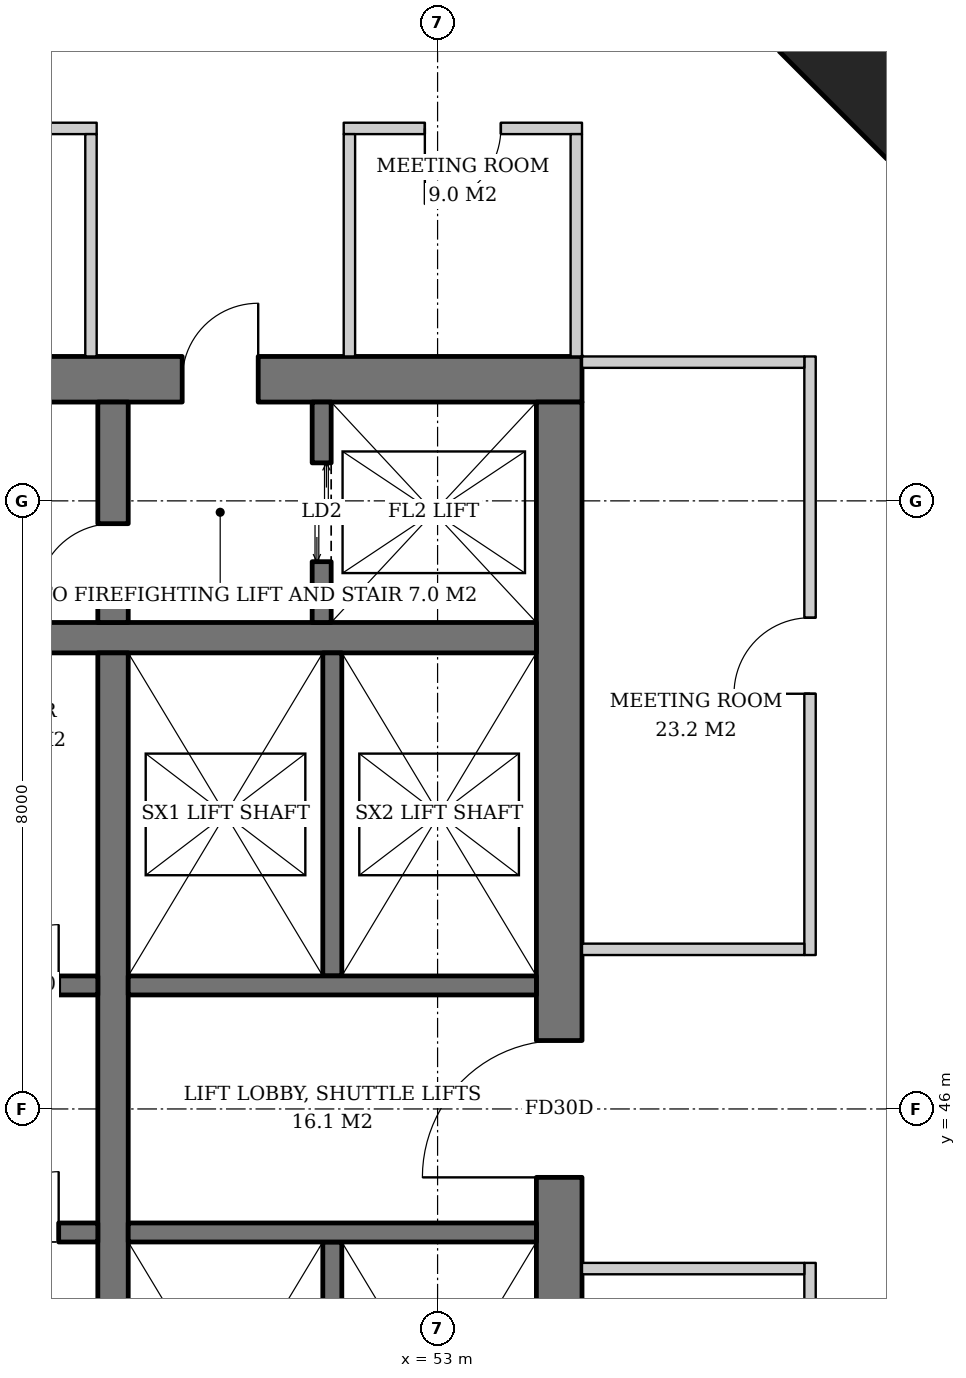
"""IFC4 building model, lengths in metres.
Left out: names, types, materials, properties, quantities, classifications, styles, units other than length and angle.
Written with IfcOpenShell. Run it as: python <this file> out.ifc"""

import sys

from ifc_helpers import new_model, si_unit, direction, frame, frame_2d, origin, origin_2d, place, context, subcontext, project, spatial, rectangle, extrude, element, fill, save


model = new_model("IFC4")
c1 = context("Model", 3, precision=1e-05, world=origin(), true_north=direction((0.0, 1.0)))
c2 = subcontext(c1, "Body", "Model", "MODEL_VIEW")
j1 = project(units=[si_unit("LENGTHUNIT", "METRE"), si_unit("PLANEANGLEUNIT", "RADIAN")], contexts=[c1])
p1 = place(None, origin())
s1 = spatial("IfcSite", under=j1, at=p1, CompositionType="ELEMENT")
p2 = place(p1, origin())
s2 = spatial("IfcBuilding", under=s1, at=p2, CompositionType="ELEMENT")
p3 = place(p2, frame((0.0, 0.0, 207.2)))
s3 = spatial("IfcBuildingStorey", under=s2, at=p3, CompositionType="ELEMENT", Elevation=207.2)
p4 = place(p3, frame((58.95, 59.95, 0.0), z_axis=(-0.031898107953, -0.031898107953, 0.998981992539), x_axis=(0.707106781187, -0.707106781187, 0.0)))
e1 = element("IfcColumn", 1, at=p4, inside=s3, PredefinedType="COLUMN", context=c2, shape_type="SweptSolid", body=[
    extrude(rectangle(XDim=2.0, YDim=2.0, at=origin_2d()), origin(), (0.0, 0.0, 1.0), 3.804),
])
p5 = place(p3, frame((35.1, 55.6, 0.0), z_axis=(0.0, 0.0, 1.0), x_axis=(1.0, 0.0, 0.0)))
e2 = element("IfcWall", 2, at=p5, inside=s3, PredefinedType="SHEAR", context=c2, shape_type="SweptSolid", body=[
    extrude(rectangle(XDim=19.8, YDim=0.6, at=frame_2d((9.9, 0.0))), origin(), (0.0, 0.0, 1.0), 3.8),
])
p6 = place(p5, frame((14.54, 0.0, 0.0)))
e3 = element("IfcOpeningElement", 3, at=p6, cuts=e2, PredefinedType="OPENING", context=c2, shape_type="SweptSolid", body=[
    extrude(rectangle(XDim=1.0, YDim=2.1, at=frame_2d((0.5, 1.05))), frame((0.0, 0.31, 0.0), z_axis=(0.0, -1.0, 0.0), x_axis=(1.0, 0.0, 0.0)), (0.0, 0.0, 1.0), 0.62),
])
p7 = place(p5, frame((1.675, 0.0, 0.0)))
e4 = element("IfcOpeningElement", 4, at=p7, cuts=e2, PredefinedType="OPENING", context=c2, shape_type="SweptSolid", body=[
    extrude(rectangle(XDim=1.0, YDim=2.1, at=frame_2d((0.5, 1.05))), frame((0.0, 0.31, 0.0), z_axis=(0.0, -1.0, 0.0), x_axis=(1.0, 0.0, 0.0)), (0.0, 0.0, 1.0), 0.62),
])
p8 = place(p5, frame((3.587, 0.0, 0.0)))
e5 = element("IfcOpeningElement", 5, at=p8, cuts=e2, PredefinedType="OPENING", context=c2, shape_type="SweptSolid", body=[
    extrude(rectangle(XDim=1.0, YDim=2.1, at=frame_2d((0.5, 1.05))), frame((0.0, 0.31, 0.0), z_axis=(0.0, -1.0, 0.0), x_axis=(1.0, 0.0, 0.0)), (0.0, 0.0, 1.0), 0.62),
])
p9 = place(p3, frame((54.6, 36.7, 0.0), z_axis=(0.0, 0.0, 1.0), x_axis=(0.0, 1.0, 0.0)))
e6 = element("IfcWall", 6, at=p9, inside=s3, PredefinedType="SHEAR", context=c2, shape_type="SweptSolid", body=[
    extrude(rectangle(XDim=18.6, YDim=0.6, at=frame_2d((9.3, 0.0))), origin(), (0.0, 0.0, 1.0), 3.8),
])
p10 = place(p9, frame((8.4, 0.0, 0.0)))
e7 = element("IfcOpeningElement", 7, at=p10, cuts=e6, PredefinedType="OPENING", context=c2, shape_type="SweptSolid", body=[
    extrude(rectangle(XDim=1.8, YDim=2.4, at=frame_2d((0.9, 1.2))), frame((0.0, 0.31, 0.0), z_axis=(0.0, -1.0, 0.0), x_axis=(1.0, 0.0, 0.0)), (0.0, 0.0, 1.0), 0.62),
])
p11 = place(p3, frame((35.7, 52.2, 0.0), z_axis=(0.0, 0.0, 1.0), x_axis=(1.0, 0.0, 0.0)))
e8 = element("IfcWall", 8, at=p11, inside=s3, PredefinedType="SHEAR", context=c2, shape_type="SweptSolid", body=[
    extrude(rectangle(XDim=18.6, YDim=0.4, at=frame_2d((9.3, 0.0))), origin(), (0.0, 0.0, 1.0), 3.8),
])
p12 = place(p3, frame((48.73, 40.0, 0.0), z_axis=(0.0, 0.0, 1.0), x_axis=(0.0, 1.0, 0.0)))
e9 = element("IfcWall", 9, at=p12, inside=s3, PredefinedType="SHEAR", context=c2, shape_type="SweptSolid", body=[
    extrude(rectangle(XDim=12.0, YDim=0.4, at=frame_2d((6.0, 0.0))), origin(), (0.0, 0.0, 1.0), 3.8),
])
p13 = place(p3, frame((48.73, 52.4, 0.0), z_axis=(0.0, 0.0, 1.0), x_axis=(0.0, 1.0, 0.0)))
e10 = element("IfcWall", 10, at=p13, inside=s3, PredefinedType="SHEAR", context=c2, shape_type="SweptSolid", body=[
    extrude(rectangle(XDim=2.9, YDim=0.4, at=frame_2d((1.45, 0.0))), origin(), (0.0, 0.0, 1.0), 3.8),
])
p14 = place(p13, frame((0.3, 0.0, 0.0)))
e11 = element("IfcOpeningElement", 11, at=p14, cuts=e10, PredefinedType="OPENING", context=c2, shape_type="SweptSolid", body=[
    extrude(rectangle(XDim=1.0, YDim=2.1, at=frame_2d((0.5, 1.05))), frame((0.0, 0.21, 0.0), z_axis=(0.0, -1.0, 0.0), x_axis=(1.0, 0.0, 0.0)), (0.0, 0.0, 1.0), 0.42),
])
p15 = place(p3, frame((51.475, 52.4, 0.0), z_axis=(0.0, 0.0, 1.0), x_axis=(0.0, 1.0, 0.0)))
e12 = element("IfcWall", 12, at=p15, inside=s3, PredefinedType="SHEAR", context=c2, shape_type="SweptSolid", body=[
    extrude(rectangle(XDim=2.9, YDim=0.25, at=frame_2d((1.45, 0.0))), origin(), (0.0, 0.0, 1.0), 3.8),
])
p16 = place(p15, frame((0.8, 0.0, 0.0)))
e13 = element("IfcOpeningElement", 13, at=p16, cuts=e12, PredefinedType="OPENING", context=c2, shape_type="SweptSolid", body=[
    extrude(rectangle(XDim=1.3, YDim=2.2, at=frame_2d((0.65, 1.1))), frame((0.0, 0.135, 0.0), z_axis=(0.0, -1.0, 0.0), x_axis=(1.0, 0.0, 0.0)), (0.0, 0.0, 1.0), 0.27),
])
p17 = place(p3, frame((35.7, 47.625, 0.0), z_axis=(0.0, 0.0, 1.0), x_axis=(1.0, 0.0, 0.0)))
e14 = element("IfcWall", 14, at=p17, inside=s3, PredefinedType="SHEAR", context=c2, shape_type="SweptSolid", body=[
    extrude(rectangle(XDim=12.83, YDim=0.25, at=frame_2d((6.415, 0.0))), origin(), (0.0, 0.0, 1.0), 3.8),
])
p18 = place(p17, frame((0.7, 0.0, 0.0)))
e15 = element("IfcOpeningElement", 15, at=p18, cuts=e14, PredefinedType="OPENING", context=c2, shape_type="SweptSolid", body=[
    extrude(rectangle(XDim=1.1, YDim=2.2, at=frame_2d((0.55, 1.1))), frame((0.0, 0.135, 0.0), z_axis=(0.0, -1.0, 0.0), x_axis=(1.0, 0.0, 0.0)), (0.0, 0.0, 1.0), 0.27),
])
p19 = place(p17, frame((3.45, 0.0, 0.0)))
e16 = element("IfcOpeningElement", 16, at=p19, cuts=e14, PredefinedType="OPENING", context=c2, shape_type="SweptSolid", body=[
    extrude(rectangle(XDim=1.1, YDim=2.2, at=frame_2d((0.55, 1.1))), frame((0.0, 0.135, 0.0), z_axis=(0.0, -1.0, 0.0), x_axis=(1.0, 0.0, 0.0)), (0.0, 0.0, 1.0), 0.27),
])
p20 = place(p17, frame((6.2, 0.0, 0.0)))
e17 = element("IfcOpeningElement", 17, at=p20, cuts=e14, PredefinedType="OPENING", context=c2, shape_type="SweptSolid", body=[
    extrude(rectangle(XDim=1.1, YDim=2.2, at=frame_2d((0.55, 1.1))), frame((0.0, 0.135, 0.0), z_axis=(0.0, -1.0, 0.0), x_axis=(1.0, 0.0, 0.0)), (0.0, 0.0, 1.0), 0.27),
])
p21 = place(p17, frame((9.0, 0.0, 0.0)))
e18 = element("IfcOpeningElement", 18, at=p21, cuts=e14, PredefinedType="OPENING", context=c2, shape_type="SweptSolid", body=[
    extrude(rectangle(XDim=1.0, YDim=2.1, at=frame_2d((0.5, 1.05))), frame((0.0, 0.135, 0.0), z_axis=(0.0, -1.0, 0.0), x_axis=(1.0, 0.0, 0.0)), (0.0, 0.0, 1.0), 0.27),
])
p22 = place(p17, frame((11.515, 0.0, 0.0)))
e19 = element("IfcOpeningElement", 19, at=p22, cuts=e14, PredefinedType="OPENING", context=c2, shape_type="SweptSolid", body=[
    extrude(rectangle(XDim=0.8, YDim=2.0, at=frame_2d((0.4, 1.0))), frame((0.0, 0.135, 0.0), z_axis=(0.0, -1.0, 0.0), x_axis=(1.0, 0.0, 0.0)), (0.0, 0.0, 1.0), 0.27),
])
p23 = place(p3, frame((35.7, 44.375, 0.0), z_axis=(0.0, 0.0, 1.0), x_axis=(1.0, 0.0, 0.0)))
e20 = element("IfcWall", 20, at=p23, inside=s3, PredefinedType="SHEAR", context=c2, shape_type="SweptSolid", body=[
    extrude(rectangle(XDim=12.83, YDim=0.25, at=frame_2d((6.415, 0.0))), origin(), (0.0, 0.0, 1.0), 3.8),
])
p24 = place(p23, frame((0.7, 0.0, 0.0)))
e21 = element("IfcOpeningElement", 21, at=p24, cuts=e20, PredefinedType="OPENING", context=c2, shape_type="SweptSolid", body=[
    extrude(rectangle(XDim=1.1, YDim=2.2, at=frame_2d((0.55, 1.1))), frame((0.0, 0.135, 0.0), z_axis=(0.0, -1.0, 0.0), x_axis=(1.0, 0.0, 0.0)), (0.0, 0.0, 1.0), 0.27),
])
p25 = place(p23, frame((3.45, 0.0, 0.0)))
e22 = element("IfcOpeningElement", 22, at=p25, cuts=e20, PredefinedType="OPENING", context=c2, shape_type="SweptSolid", body=[
    extrude(rectangle(XDim=1.1, YDim=2.2, at=frame_2d((0.55, 1.1))), frame((0.0, 0.135, 0.0), z_axis=(0.0, -1.0, 0.0), x_axis=(1.0, 0.0, 0.0)), (0.0, 0.0, 1.0), 0.27),
])
p26 = place(p23, frame((6.2, 0.0, 0.0)))
e23 = element("IfcOpeningElement", 23, at=p26, cuts=e20, PredefinedType="OPENING", context=c2, shape_type="SweptSolid", body=[
    extrude(rectangle(XDim=1.1, YDim=2.2, at=frame_2d((0.55, 1.1))), frame((0.0, 0.135, 0.0), z_axis=(0.0, -1.0, 0.0), x_axis=(1.0, 0.0, 0.0)), (0.0, 0.0, 1.0), 0.27),
])
p27 = place(p23, frame((9.0, 0.0, 0.0)))
e24 = element("IfcOpeningElement", 24, at=p27, cuts=e20, PredefinedType="OPENING", context=c2, shape_type="SweptSolid", body=[
    extrude(rectangle(XDim=1.0, YDim=2.1, at=frame_2d((0.5, 1.05))), frame((0.0, 0.135, 0.0), z_axis=(0.0, -1.0, 0.0), x_axis=(1.0, 0.0, 0.0)), (0.0, 0.0, 1.0), 0.27),
])
p28 = place(p23, frame((11.515, 0.0, 0.0)))
e25 = element("IfcOpeningElement", 25, at=p28, cuts=e20, PredefinedType="OPENING", context=c2, shape_type="SweptSolid", body=[
    extrude(rectangle(XDim=0.8, YDim=2.0, at=frame_2d((0.4, 1.0))), frame((0.0, 0.135, 0.0), z_axis=(0.0, -1.0, 0.0), x_axis=(1.0, 0.0, 0.0)), (0.0, 0.0, 1.0), 0.27),
])
p29 = place(p3, frame((51.615, 47.75, 0.0), z_axis=(0.0, 0.0, 1.0), x_axis=(0.0, 1.0, 0.0)))
e26 = element("IfcWall", 26, at=p29, inside=s3, PredefinedType="SHEAR", context=c2, shape_type="SweptSolid", body=[
    extrude(rectangle(XDim=4.25, YDim=0.25, at=frame_2d((2.125, 0.0))), origin(), (0.0, 0.0, 1.0), 3.8),
])
p30 = place(p3, frame((48.93, 47.625, 0.0), z_axis=(0.0, 0.0, 1.0), x_axis=(1.0, 0.0, 0.0)))
e27 = element("IfcWall", 27, at=p30, inside=s3, PredefinedType="SHEAR", context=c2, shape_type="SweptSolid", body=[
    extrude(rectangle(XDim=5.37, YDim=0.25, at=frame_2d((2.685, 0.0))), origin(), (0.0, 0.0, 1.0), 3.8),
])
p31 = place(p3, frame((51.615, 44.25, 0.0), z_axis=(0.0, 0.0, 1.0), x_axis=(0.0, -1.0, 0.0)))
e28 = element("IfcWall", 28, at=p31, inside=s3, PredefinedType="SHEAR", context=c2, shape_type="SweptSolid", body=[
    extrude(rectangle(XDim=4.25, YDim=0.25, at=frame_2d((2.125, 0.0))), origin(), (0.0, 0.0, 1.0), 3.8),
])
p32 = place(p3, frame((48.93, 44.375, 0.0), z_axis=(0.0, 0.0, 1.0), x_axis=(1.0, 0.0, 0.0)))
e29 = element("IfcWall", 29, at=p32, inside=s3, PredefinedType="SHEAR", context=c2, shape_type="SweptSolid", body=[
    extrude(rectangle(XDim=5.37, YDim=0.25, at=frame_2d((2.685, 0.0))), origin(), (0.0, 0.0, 1.0), 3.8),
])
p33 = place(p3, frame((57.9, 36.1, 0.0), z_axis=(0.0, 0.0, 1.0), x_axis=(0.0, 1.0, 0.0)))
e30 = element("IfcWall", 30, at=p33, inside=s3, PredefinedType="PARTITIONING", context=c2, shape_type="SweptSolid", body=[
    extrude(rectangle(XDim=7.875, YDim=0.15, at=frame_2d((3.938, 0.0))), origin(), (0.0, 0.0, 1.0), 2.867),
])
p34 = place(p33, frame((3.438, 0.0, 0.0)))
e31 = element("IfcOpeningElement", 31, at=p34, cuts=e30, PredefinedType="OPENING", context=c2, shape_type="SweptSolid", body=[
    extrude(rectangle(XDim=1.0, YDim=2.1, at=frame_2d((0.5, 1.05))), frame((0.0, 0.085, 0.0), z_axis=(0.0, -1.0, 0.0), x_axis=(1.0, 0.0, 0.0)), (0.0, 0.0, 1.0), 0.17),
])
p35 = place(p3, frame((54.9, 43.9, 0.0), z_axis=(0.0, 0.0, 1.0), x_axis=(1.0, 0.0, 0.0)))
e32 = element("IfcWall", 32, at=p35, inside=s3, PredefinedType="PARTITIONING", context=c2, shape_type="SweptSolid", body=[
    extrude(rectangle(XDim=2.925, YDim=0.15, at=frame_2d((1.462, 0.0))), origin(), (0.0, 0.0, 1.0), 3.62),
])
p36 = place(p3, frame((57.9, 48.025, 0.0), z_axis=(0.0, 0.0, 1.0), x_axis=(0.0, 1.0, 0.0)))
e33 = element("IfcWall", 33, at=p36, inside=s3, PredefinedType="PARTITIONING", context=c2, shape_type="SweptSolid", body=[
    extrude(rectangle(XDim=7.875, YDim=0.15, at=frame_2d((3.938, 0.0))), origin(), (0.0, 0.0, 1.0), 2.867),
])
p37 = place(p36, frame((3.438, 0.0, 0.0)))
e34 = element("IfcOpeningElement", 34, at=p37, cuts=e33, PredefinedType="OPENING", context=c2, shape_type="SweptSolid", body=[
    extrude(rectangle(XDim=1.0, YDim=2.1, at=frame_2d((0.5, 1.05))), frame((0.0, 0.085, 0.0), z_axis=(0.0, -1.0, 0.0), x_axis=(1.0, 0.0, 0.0)), (0.0, 0.0, 1.0), 0.17),
])
p38 = place(p3, frame((54.9, 48.1, 0.0), z_axis=(0.0, 0.0, 1.0), x_axis=(1.0, 0.0, 0.0)))
e35 = element("IfcWall", 35, at=p38, inside=s3, PredefinedType="PARTITIONING", context=c2, shape_type="SweptSolid", body=[
    extrude(rectangle(XDim=2.925, YDim=0.15, at=frame_2d((1.462, 0.0))), origin(), (0.0, 0.0, 1.0), 2.867),
])
p39 = place(p3, frame((54.9, 55.825, 0.0), z_axis=(0.0, 0.0, 1.0), x_axis=(1.0, 0.0, 0.0)))
e36 = element("IfcWall", 36, at=p39, inside=s3, PredefinedType="PARTITIONING", context=c2, shape_type="SweptSolid", body=[
    extrude(rectangle(XDim=2.925, YDim=0.15, at=frame_2d((1.462, 0.0))), origin(), (0.0, 0.0, 1.0), 3.62),
])
p40 = place(p3, frame((54.9, 58.9, 0.0), z_axis=(0.0, 0.0, 1.0), x_axis=(-1.0, 0.0, 0.0)))
e37 = element("IfcWall", 37, at=p40, inside=s3, PredefinedType="PARTITIONING", context=c2, shape_type="SweptSolid", body=[
    extrude(rectangle(XDim=3.135, YDim=0.15, at=frame_2d((1.567, 0.0))), origin(), (0.0, 0.0, 1.0), 2.92),
])
p41 = place(p40, frame((1.067, 0.0, 0.0)))
e38 = element("IfcOpeningElement", 38, at=p41, cuts=e37, PredefinedType="OPENING", context=c2, shape_type="SweptSolid", body=[
    extrude(rectangle(XDim=1.0, YDim=2.1, at=frame_2d((0.5, 1.05))), frame((0.0, 0.085, 0.0), z_axis=(0.0, -1.0, 0.0), x_axis=(1.0, 0.0, 0.0)), (0.0, 0.0, 1.0), 0.17),
])
p42 = place(p3, frame((54.825, 55.9, 0.0), z_axis=(0.0, 0.0, 1.0), x_axis=(0.0, 1.0, 0.0)))
e39 = element("IfcWall", 39, at=p42, inside=s3, PredefinedType="PARTITIONING", context=c2, shape_type="SweptSolid", body=[
    extrude(rectangle(XDim=2.925, YDim=0.15, at=frame_2d((1.462, 0.0))), origin(), (0.0, 0.0, 1.0), 2.867),
])
p43 = place(p3, frame((51.84, 55.9, 0.0), z_axis=(0.0, 0.0, 1.0), x_axis=(0.0, 1.0, 0.0)))
e40 = element("IfcWall", 40, at=p43, inside=s3, PredefinedType="PARTITIONING", context=c2, shape_type="SweptSolid", body=[
    extrude(rectangle(XDim=2.925, YDim=0.15, at=frame_2d((1.462, 0.0))), origin(), (0.0, 0.0, 1.0), 3.62),
])
p44 = place(p3, frame((48.515, 58.9, 0.0), z_axis=(0.0, 0.0, 1.0), x_axis=(-1.0, 0.0, 0.0)))
e41 = element("IfcWall", 41, at=p44, inside=s3, PredefinedType="PARTITIONING", context=c2, shape_type="SweptSolid", body=[
    extrude(rectangle(XDim=7.702, YDim=0.15, at=frame_2d((3.851, 0.0))), origin(), (0.0, 0.0, 1.0), 2.867),
])
p45 = place(p44, frame((3.351, 0.0, 0.0)))
e42 = element("IfcOpeningElement", 42, at=p45, cuts=e41, PredefinedType="OPENING", context=c2, shape_type="SweptSolid", body=[
    extrude(rectangle(XDim=1.0, YDim=2.1, at=frame_2d((0.5, 1.05))), frame((0.0, 0.085, 0.0), z_axis=(0.0, -1.0, 0.0), x_axis=(1.0, 0.0, 0.0)), (0.0, 0.0, 1.0), 0.17),
])
p46 = place(p3, frame((48.44, 55.9, 0.0), z_axis=(0.0, 0.0, 1.0), x_axis=(0.0, 1.0, 0.0)))
e43 = element("IfcWall", 43, at=p46, inside=s3, PredefinedType="PARTITIONING", context=c2, shape_type="SweptSolid", body=[
    extrude(rectangle(XDim=2.925, YDim=0.15, at=frame_2d((1.462, 0.0))), origin(), (0.0, 0.0, 1.0), 3.62),
])
p47 = place(p16, origin())
e44 = element("IfcDoor", 44, at=p47, inside=s3, OperationType="DOUBLE_DOOR_SLIDING", PredefinedType="DOOR", context=c2, shape_type="SweptSolid", body=[
    extrude(rectangle(XDim=1.3, YDim=2.2, at=frame_2d((0.65, 1.1))), frame((0.0, 0.025, 0.0), z_axis=(0.0, -1.0, 0.0), x_axis=(1.0, 0.0, 0.0)), (0.0, 0.0, 1.0), 0.05),
])
fill(e13, e44)
p48 = place(p22, origin())
e45 = element("IfcDoor", 45, at=p48, inside=s3, OperationType="SINGLE_SWING_RIGHT", PredefinedType="DOOR", context=c2, shape_type="SweptSolid", body=[
    extrude(rectangle(XDim=0.8, YDim=2.0, at=frame_2d((0.4, 1.0))), frame((0.0, 0.025, 0.0), z_axis=(0.0, -1.0, 0.0), x_axis=(1.0, 0.0, 0.0)), (0.0, 0.0, 1.0), 0.05),
])
fill(e19, e45)
p49 = place(p28, origin())
e46 = element("IfcDoor", 46, at=p49, inside=s3, OperationType="SINGLE_SWING_RIGHT", PredefinedType="DOOR", context=c2, shape_type="SweptSolid", body=[
    extrude(rectangle(XDim=0.8, YDim=2.0, at=frame_2d((0.4, 1.0))), frame((0.0, 0.025, 0.0), z_axis=(0.0, -1.0, 0.0), x_axis=(1.0, 0.0, 0.0)), (0.0, 0.0, 1.0), 0.05),
])
fill(e25, e46)
p50 = place(p14, origin())
e47 = element("IfcDoor", 47, at=p50, inside=s3, OperationType="SINGLE_SWING_LEFT", PredefinedType="DOOR", context=c2, shape_type="SweptSolid", body=[
    extrude(rectangle(XDim=1.0, YDim=2.1, at=frame_2d((0.5, 1.05))), frame((0.0, 0.025, 0.0), z_axis=(0.0, -1.0, 0.0), x_axis=(1.0, 0.0, 0.0)), (0.0, 0.0, 1.0), 0.05),
])
fill(e11, e47)
p51 = place(p6, origin())
e48 = element("IfcDoor", 48, at=p51, inside=s3, OperationType="SINGLE_SWING_RIGHT", PredefinedType="DOOR", context=c2, shape_type="SweptSolid", body=[
    extrude(rectangle(XDim=1.0, YDim=2.1, at=frame_2d((0.5, 1.05))), frame((0.0, 0.025, 0.0), z_axis=(0.0, -1.0, 0.0), x_axis=(1.0, 0.0, 0.0)), (0.0, 0.0, 1.0), 0.05),
])
fill(e3, e48)
p52 = place(p10, origin())
e49 = element("IfcDoor", 49, at=p52, inside=s3, OperationType="DOUBLE_DOOR_SINGLE_SWING", PredefinedType="DOOR", context=c2, shape_type="SweptSolid", body=[
    extrude(rectangle(XDim=1.8, YDim=2.4, at=frame_2d((0.9, 1.2))), frame((0.0, 0.025, 0.0), z_axis=(0.0, -1.0, 0.0), x_axis=(1.0, 0.0, 0.0)), (0.0, 0.0, 1.0), 0.05),
])
fill(e7, e49)
p53 = place(p37, origin())
e50 = element("IfcDoor", 50, at=p53, inside=s3, OperationType="SINGLE_SWING_LEFT", PredefinedType="DOOR", context=c2, shape_type="SweptSolid", body=[
    extrude(rectangle(XDim=1.0, YDim=2.1, at=frame_2d((0.5, 1.05))), frame((0.0, 0.025, 0.0), z_axis=(0.0, -1.0, 0.0), x_axis=(1.0, 0.0, 0.0)), (0.0, 0.0, 1.0), 0.05),
])
fill(e34, e50)
p54 = place(p41, origin())
e51 = element("IfcDoor", 51, at=p54, inside=s3, OperationType="SINGLE_SWING_RIGHT", PredefinedType="DOOR", context=c2, shape_type="SweptSolid", body=[
    extrude(rectangle(XDim=1.0, YDim=2.1, at=frame_2d((0.5, 1.05))), frame((0.0, 0.025, 0.0), z_axis=(0.0, -1.0, 0.0), x_axis=(1.0, 0.0, 0.0)), (0.0, 0.0, 1.0), 0.05),
])
fill(e38, e51)
save(model, sys.argv[1])
